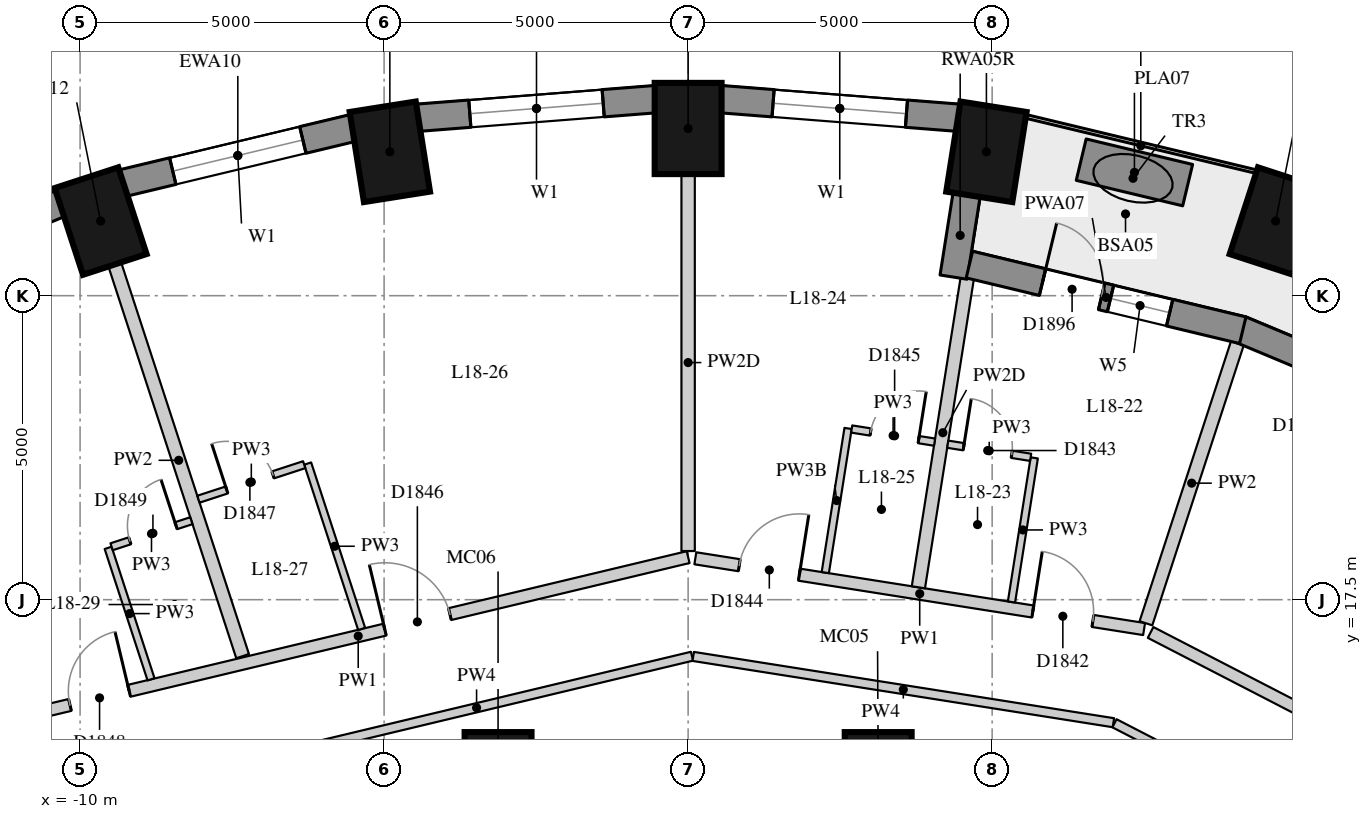
"""IFC4 building model, lengths in metres.
Left out: names, types, materials, properties, quantities, classifications, styles, units other than length and angle.
Written with IfcOpenShell. Run it as: python <this file> out.ifc"""

import sys

from ifc_helpers import new_model, si_unit, direction, frame, frame_2d, origin, origin_2d, place, context, subcontext, project, spatial, rectangle, extrude, element, fill, save


model = new_model("IFC4")
c1 = context("Model", 3, precision=1e-05, world=origin(), true_north=direction((0.0, 1.0)))
c2 = subcontext(c1, "Body", "Model", "MODEL_VIEW")
j1 = project(units=[si_unit("LENGTHUNIT", "METRE"), si_unit("PLANEANGLEUNIT", "RADIAN")], contexts=[c1])
p1 = place(None, origin())
s1 = spatial("IfcSite", under=j1, at=p1, CompositionType="ELEMENT")
p2 = place(p1, origin())
s2 = spatial("IfcBuilding", under=s1, at=p2, CompositionType="ELEMENT")
p3 = place(p2, frame((0.0, 0.0, 67.9)))
s3 = spatial("IfcBuildingStorey", under=s2, at=p3, CompositionType="ELEMENT", Elevation=67.9)
for number, where, z_axis, x_axis in (
    (1, (9.662, 23.727, 0.0), (0.0, 0.0, 1.0), (0.31, 0.951, 0.0)),
    (2, (4.906, 24.866, 0.0), (0.0, 0.0, 1.0), (0.156, 0.988, 0.0)),
    (3, (0.0, 25.25, 0.0), (0.0, 0.0, 1.0), (0.0, 1.0, 0.0)),
    (4, (-4.906, 24.866, 0.0), (0.0, 0.0, 1.0), (-0.156, 0.988, 0.0)),
    (5, (-9.662, 23.727, 0.0), (0.0, 0.0, 1.0), (-0.31, 0.951, 0.0)),
):
    element("IfcColumn", number, at=place(p3, frame(where, z_axis=z_axis, x_axis=x_axis)), inside=s3, PredefinedType="COLUMN", context=c2, shape_type="SweptSolid", body=[
        extrude(rectangle(XDim=1.5, YDim=1.1, at=origin_2d()), origin(), (0.0, 0.0, 1.0), 3.3),
    ])
for number, where, z_axis, x_axis in (
    (6, (3.126, 14.772, 0.0), (0.0, 0.0, 1.0), (1.0, 0.0, 0.0)),
    (7, (-3.126, 14.772, 0.0), (0.0, 0.0, 1.0), (1.0, 0.0, 0.0)),
):
    element("IfcColumn", number, at=place(p3, frame(where, z_axis=z_axis, x_axis=x_axis)), inside=s3, PredefinedType="COLUMN", context=c2, shape_type="SweptSolid", body=[
        extrude(rectangle(XDim=1.1, YDim=1.1, at=origin_2d()), origin(), (0.0, 0.0, 1.0), 3.3),
    ])
p4 = place(p3, frame((4.457, 25.426, 0.0), z_axis=(0.0, 0.0, 1.0), x_axis=(-0.996955972145, 0.077966592873, 0.0)))
e8 = element("IfcWall", 8, at=p4, inside=s3, PredefinedType="SOLIDWALL", context=c2, shape_type="SweptSolid", body=[
    extrude(rectangle(XDim=3.939, YDim=0.45, at=frame_2d((1.97, 0.0))), origin(), (0.0, 0.0, 1.0), 3.02),
])
p5 = place(p4, frame((0.87, 0.0, 0.4)))
e9 = element("IfcOpeningElement", 9, at=p5, cuts=e8, PredefinedType="OPENING", context=c2, shape_type="SweptSolid", body=[
    extrude(rectangle(XDim=2.2, YDim=1.75, at=frame_2d((1.1, 0.875))), frame((0.0, 0.235, 0.0), z_axis=(0.0, -1.0, 0.0), x_axis=(1.0, 0.0, 0.0)), (0.0, 0.0, 1.0), 0.47),
])
p6 = place(p3, frame((-0.53, 25.733, 0.0), z_axis=(0.0, 0.0, 1.0), x_axis=(-0.996955972145, -0.077966592873, 0.0)))
e10 = element("IfcWall", 10, at=p6, inside=s3, PredefinedType="SOLIDWALL", context=c2, shape_type="SweptSolid", body=[
    extrude(rectangle(XDim=3.939, YDim=0.45, at=frame_2d((1.97, 0.0))), origin(), (0.0, 0.0, 1.0), 3.02),
])
p7 = place(p6, frame((0.87, 0.0, 0.4)))
e11 = element("IfcOpeningElement", 11, at=p7, cuts=e10, PredefinedType="OPENING", context=c2, shape_type="SweptSolid", body=[
    extrude(rectangle(XDim=2.2, YDim=1.75, at=frame_2d((1.1, 0.875))), frame((0.0, 0.235, 0.0), z_axis=(0.0, -1.0, 0.0), x_axis=(1.0, 0.0, 0.0)), (0.0, 0.0, 1.0), 0.47),
])
p8 = place(p3, frame((-5.504, 25.26, 0.0), z_axis=(0.0, 0.0, 1.0), x_axis=(-0.972496561493, -0.232917233979, 0.0)))
e12 = element("IfcWall", 12, at=p8, inside=s3, PredefinedType="SOLIDWALL", context=c2, shape_type="SweptSolid", body=[
    extrude(rectangle(XDim=3.911, YDim=0.45, at=frame_2d((1.956, 0.0))), origin(), (0.0, 0.0, 1.0), 3.02),
])
p9 = place(p8, frame((0.855, 0.0, 0.4)))
e13 = element("IfcOpeningElement", 13, at=p9, cuts=e12, PredefinedType="OPENING", context=c2, shape_type="SweptSolid", body=[
    extrude(rectangle(XDim=2.2, YDim=1.75, at=frame_2d((1.1, 0.875))), frame((0.0, 0.235, 0.0), z_axis=(0.0, -1.0, 0.0), x_axis=(1.0, 0.0, 0.0)), (0.0, 0.0, 1.0), 0.47),
])
p10 = place(p3, frame((-10.315, 24.021, 0.0), z_axis=(0.0, 0.0, 1.0), x_axis=(-0.923031964282, -0.384723267966, 0.0)))
e14 = element("IfcWall", 14, at=p10, inside=s3, PredefinedType="SOLIDWALL", context=c2, shape_type="SweptSolid", body=[
    extrude(rectangle(XDim=3.856, YDim=0.45, at=frame_2d((1.928, 0.0))), origin(), (0.0, 0.0, 1.0), 3.02),
])
p11 = place(p10, frame((0.828, 0.0, 0.4)))
e15 = element("IfcOpeningElement", 15, at=p11, cuts=e14, PredefinedType="OPENING", context=c2, shape_type="SweptSolid", body=[
    extrude(rectangle(XDim=2.2, YDim=1.75, at=frame_2d((1.1, 0.875))), frame((0.0, 0.235, 0.0), z_axis=(0.0, -1.0, 0.0), x_axis=(1.0, 0.0, 0.0)), (0.0, 0.0, 1.0), 0.47),
])
p12 = place(p3, frame((4.583, 24.178, 0.0), z_axis=(0.0, 0.0, 1.0), x_axis=(-0.156133927791, -0.98773589415, 0.0)))
e16 = element("IfcWall", 16, at=p12, inside=s3, PredefinedType="SOLIDWALL", context=c2, shape_type="SweptSolid", body=[
    extrude(rectangle(XDim=1.39, YDim=0.45, at=frame_2d((0.695, 0.0))), origin(), (0.0, 0.0, 1.0), 2.47),
])
p13 = place(p3, frame((13.31, 20.178, 0.0), z_axis=(0.0, 0.0, 1.0), x_axis=(-0.922634412489, 0.385675693935, 0.0)))
e17 = element("IfcWall", 17, at=p13, inside=s3, PredefinedType="SOLIDWALL", context=c2, shape_type="SweptSolid", body=[
    extrude(rectangle(XDim=4.577, YDim=0.45, at=frame_2d((2.288, 0.0))), origin(), (0.0, 0.0, 1.0), 3.02),
])
p14 = place(p13, frame((1.213, 0.0, 0.4)))
e18 = element("IfcOpeningElement", 18, at=p14, cuts=e17, PredefinedType="OPENING", context=c2, shape_type="SweptSolid", body=[
    extrude(rectangle(XDim=1.0, YDim=1.75, at=frame_2d((0.5, 0.875))), frame((0.0, 0.235, 0.0), z_axis=(0.0, -1.0, 0.0), x_axis=(1.0, 0.0, 0.0)), (0.0, 0.0, 1.0), 0.47),
])
p15 = place(p13, frame((2.363, 0.0, 0.0)))
e19 = element("IfcOpeningElement", 19, at=p15, cuts=e17, PredefinedType="OPENING", context=c2, shape_type="SweptSolid", body=[
    extrude(rectangle(XDim=1.0, YDim=2.15, at=frame_2d((0.5, 1.075))), frame((0.0, 0.235, 0.0), z_axis=(0.0, -1.0, 0.0), x_axis=(1.0, 0.0, 0.0)), (0.0, 0.0, 1.0), 0.47),
])
p16 = place(p3, frame((9.122, 21.932, 0.0), z_axis=(0.0, 0.0, 1.0), x_axis=(-0.972346547441, 0.233542697764, 0.0)))
e20 = element("IfcWall", 20, at=p16, inside=s3, PredefinedType="SOLIDWALL", context=c2, shape_type="SweptSolid", body=[
    extrude(rectangle(XDim=4.624, YDim=0.45, at=frame_2d((2.312, 0.0))), origin(), (0.0, 0.0, 1.0), 3.02),
])
p17 = place(p16, frame((1.237, 0.0, 0.4)))
e21 = element("IfcOpeningElement", 21, at=p17, cuts=e20, PredefinedType="OPENING", context=c2, shape_type="SweptSolid", body=[
    extrude(rectangle(XDim=1.0, YDim=1.75, at=frame_2d((0.5, 0.875))), frame((0.0, 0.235, 0.0), z_axis=(0.0, -1.0, 0.0), x_axis=(1.0, 0.0, 0.0)), (0.0, 0.0, 1.0), 0.47),
])
p18 = place(p16, frame((2.387, 0.0, 0.0)))
e22 = element("IfcOpeningElement", 22, at=p18, cuts=e20, PredefinedType="OPENING", context=c2, shape_type="SweptSolid", body=[
    extrude(rectangle(XDim=1.0, YDim=2.15, at=frame_2d((0.5, 1.075))), frame((0.0, 0.235, 0.0), z_axis=(0.0, -1.0, 0.0), x_axis=(1.0, 0.0, 0.0)), (0.0, 0.0, 1.0), 0.47),
])
p19 = place(p3, frame((8.215, 24.318, 0.0), z_axis=(0.0, 0.0, 1.0), x_axis=(-0.972504142103, 0.232885580473, 0.0)))
e23 = element("IfcWall", 23, at=p19, inside=s3, PredefinedType="USERDEFINED", context=c2, shape_type="SweptSolid", body=[
    extrude(rectangle(XDim=1.8, YDim=0.7, at=frame_2d((0.9, 0.0))), origin(), (0.0, 0.0, 1.0), 0.75),
])
p20 = place(p3, frame((-10.852, 15.605, 0.0), z_axis=(0.0, 0.0, 1.0), x_axis=(0.972573296372, 0.232596610431, 0.0)))
e24 = element("IfcWall", 24, at=p20, inside=s3, PredefinedType="PARTITIONING", context=c2, shape_type="SweptSolid", body=[
    extrude(rectangle(XDim=11.157, YDim=0.2, at=frame_2d((5.579, 0.0))), origin(), (0.0, 0.0, 1.0), 3.02),
])
p21 = place(p20, frame((6.029, 0.0, 0.0)))
e25 = element("IfcOpeningElement", 25, at=p21, cuts=e24, PredefinedType="OPENING", context=c2, shape_type="SweptSolid", body=[
    extrude(rectangle(XDim=1.1, YDim=2.1, at=frame_2d((0.55, 1.05))), frame((0.0, 0.11, 0.0), z_axis=(0.0, -1.0, 0.0), x_axis=(1.0, 0.0, 0.0)), (0.0, 0.0, 1.0), 0.22),
])
p22 = place(p20, frame((0.705, 0.0, 0.0)))
e26 = element("IfcOpeningElement", 26, at=p22, cuts=e24, PredefinedType="OPENING", context=c2, shape_type="SweptSolid", body=[
    extrude(rectangle(XDim=1.0, YDim=2.1, at=frame_2d((0.5, 1.05))), frame((0.0, 0.11, 0.0), z_axis=(0.0, -1.0, 0.0), x_axis=(1.0, 0.0, 0.0)), (0.0, 0.0, 1.0), 0.22),
])
p23 = place(p3, frame((0.119, 18.181, 0.0), z_axis=(0.0, 0.0, 1.0), x_axis=(0.987788122462, -0.155803161464, 0.0)))
e27 = element("IfcWall", 27, at=p23, inside=s3, PredefinedType="PARTITIONING", context=c2, shape_type="SweptSolid", body=[
    extrude(rectangle(XDim=7.471, YDim=0.2, at=frame_2d((3.736, 0.0))), origin(), (0.0, 0.0, 1.0), 3.02),
])
p24 = place(p23, frame((5.619, 0.0, 0.0)))
e28 = element("IfcOpeningElement", 28, at=p24, cuts=e27, PredefinedType="OPENING", context=c2, shape_type="SweptSolid", body=[
    extrude(rectangle(XDim=1.0, YDim=2.1, at=frame_2d((0.5, 1.05))), frame((0.0, 0.11, 0.0), z_axis=(0.0, -1.0, 0.0), x_axis=(1.0, 0.0, 0.0)), (0.0, 0.0, 1.0), 0.22),
])
p25 = place(p23, frame((0.732, 0.0, 0.0)))
e29 = element("IfcOpeningElement", 29, at=p25, cuts=e27, PredefinedType="OPENING", context=c2, shape_type="SweptSolid", body=[
    extrude(rectangle(XDim=1.0, YDim=2.1, at=frame_2d((0.5, 1.05))), frame((0.0, 0.11, 0.0), z_axis=(0.0, -1.0, 0.0), x_axis=(1.0, 0.0, 0.0)), (0.0, 0.0, 1.0), 0.22),
])
p26 = place(p3, frame((7.606, 16.961, 0.0), z_axis=(0.0, 0.0, 1.0), x_axis=(0.888519518851, -0.45883882205, 0.0)))
e30 = element("IfcWall", 30, at=p26, inside=s3, PredefinedType="PARTITIONING", context=c2, shape_type="SweptSolid", body=[
    extrude(rectangle(XDim=7.142, YDim=0.2, at=frame_2d((3.571, 0.0))), origin(), (0.0, 0.0, 1.0), 3.02),
])
p27 = place(p26, frame((3.342, 0.0, 0.0)))
e31 = element("IfcOpeningElement", 31, at=p27, cuts=e30, PredefinedType="OPENING", context=c2, shape_type="SweptSolid", body=[
    extrude(rectangle(XDim=1.1, YDim=2.1, at=frame_2d((0.55, 1.05))), frame((0.0, 0.11, 0.0), z_axis=(0.0, -1.0, 0.0), x_axis=(1.0, 0.0, 0.0)), (0.0, 0.0, 1.0), 0.22),
])
p28 = place(p3, frame((-7.022, 14.875, 0.0), z_axis=(0.0, 0.0, 1.0), x_axis=(0.972565872543, 0.232627650043, 0.0)))
e32 = element("IfcWall", 32, at=p28, inside=s3, PredefinedType="PARTITIONING", context=c2, shape_type="SweptSolid", body=[
    extrude(rectangle(XDim=7.286, YDim=0.15, at=frame_2d((3.643, 0.0))), origin(), (0.0, 0.0, 1.0), 3.02),
])
p29 = place(p3, frame((0.083, 16.567, 0.0), z_axis=(0.0, 0.0, 1.0), x_axis=(0.987781067139, -0.15584788546, 0.0)))
e33 = element("IfcWall", 33, at=p29, inside=s3, PredefinedType="PARTITIONING", context=c2, shape_type="SweptSolid", body=[
    extrude(rectangle(XDim=6.996, YDim=0.15, at=frame_2d((3.498, 0.0))), origin(), (0.0, 0.0, 1.0), 3.02),
])
p30 = place(p3, frame((7.012, 15.467, 0.0), z_axis=(0.0, 0.0, 1.0), x_axis=(0.888509096081, -0.458859004685, 0.0)))
e34 = element("IfcWall", 34, at=p30, inside=s3, PredefinedType="PARTITIONING", context=c2, shape_type="SweptSolid", body=[
    extrude(rectangle(XDim=6.561, YDim=0.15, at=frame_2d((3.281, 0.0))), origin(), (0.0, 0.0, 1.0), 3.02),
])
p31 = place(p3, frame((9.034, 21.721, 0.0), z_axis=(0.0, 0.0, 1.0), x_axis=(-0.310330277344, -0.95062880188, 0.0)))
e35 = element("IfcWall", 35, at=p31, inside=s3, PredefinedType="PARTITIONING", context=c2, shape_type="SweptSolid", body=[
    extrude(rectangle(XDim=4.848, YDim=0.22, at=frame_2d((2.424, 0.0))), origin(), (0.0, 0.0, 1.0), 3.02),
])
p32 = place(p3, frame((4.591, 22.789, 0.0), z_axis=(0.0, 0.0, 1.0), x_axis=(-0.156172011014, -0.987729873486, 0.0)))
e36 = element("IfcWall", 36, at=p32, inside=s3, PredefinedType="PARTITIONING", context=c2, shape_type="SweptSolid", body=[
    extrude(rectangle(XDim=5.148, YDim=0.22, at=frame_2d((2.574, 0.0))), origin(), (0.0, 0.0, 1.0), 2.47),
])
p33 = place(p3, frame((0.0, 24.5, 0.0), z_axis=(0.0, 0.0, 1.0), x_axis=(0.0, -1.0, 0.0)))
e37 = element("IfcWall", 37, at=p33, inside=s3, PredefinedType="PARTITIONING", context=c2, shape_type="SweptSolid", body=[
    extrude(rectangle(XDim=6.2, YDim=0.22, at=frame_2d((3.1, 0.0))), origin(), (0.0, 0.0, 1.0), 2.47),
])
p34 = place(p3, frame((-9.429, 23.014, 0.0), z_axis=(0.0, 0.0, 1.0), x_axis=(0.310223739243, -0.950663574357, 0.0)))
e38 = element("IfcWall", 38, at=p34, inside=s3, PredefinedType="PARTITIONING", context=c2, shape_type="SweptSolid", body=[
    extrude(rectangle(XDim=6.778, YDim=0.22, at=frame_2d((3.389, 0.0))), origin(), (0.0, 0.0, 1.0), 3.02),
])
p35 = place(p3, frame((5.318, 17.462, 0.0), z_axis=(0.0, 0.0, 1.0), x_axis=(0.156077517275, 0.987744809453, 0.0)))
e39 = element("IfcWall", 39, at=p35, inside=s3, PredefinedType="PARTITIONING", context=c2, shape_type="SweptSolid", body=[
    extrude(rectangle(XDim=2.399, YDim=0.12, at=frame_2d((1.2, 0.0))), origin(), (0.0, 0.0, 1.0), 3.02),
])
p36 = place(p3, frame((2.256, 17.945, 0.0), z_axis=(0.0, 0.0, 1.0), x_axis=(0.156114026572, 0.987739039781, 0.0)))
e40 = element("IfcWall", 40, at=p36, inside=s3, PredefinedType="PARTITIONING", context=c2, shape_type="SweptSolid", body=[
    extrude(rectangle(XDim=2.401, YDim=0.12, at=frame_2d((1.2, 0.0))), origin(), (0.0, 0.0, 1.0), 2.47),
])
p37 = place(p3, frame((-5.369, 17.019, 0.0), z_axis=(0.0, 0.0, 1.0), x_axis=(-0.310231838646, 0.950660931295, 0.0)))
e41 = element("IfcWall", 41, at=p37, inside=s3, PredefinedType="PARTITIONING", context=c2, shape_type="SweptSolid", body=[
    extrude(rectangle(XDim=2.861, YDim=0.12, at=frame_2d((1.431, 0.0))), origin(), (0.0, 0.0, 1.0), 3.02),
])
p38 = place(p3, frame((-8.833, 16.19, 0.0), z_axis=(0.0, 0.0, 1.0), x_axis=(-0.310231525188, 0.950661033586, 0.0)))
e42 = element("IfcWall", 42, at=p38, inside=s3, PredefinedType="PARTITIONING", context=c2, shape_type="SweptSolid", body=[
    extrude(rectangle(XDim=2.274, YDim=0.12, at=frame_2d((1.137, 0.0))), origin(), (0.0, 0.0, 1.0), 3.02),
])
p39 = place(p3, frame((5.633, 19.842, 0.0), z_axis=(0.0, 0.0, 1.0), x_axis=(-0.987722767831, 0.156216945011, 0.0)))
e43 = element("IfcWall", 43, at=p39, inside=s3, PredefinedType="PARTITIONING", context=c2, shape_type="SweptSolid", body=[
    extrude(rectangle(XDim=1.38, YDim=0.12, at=frame_2d((0.69, 0.0))), origin(), (0.0, 0.0, 1.0), 3.02),
])
p40 = place(p39, frame((0.315, 0.0, 0.0)))
e44 = element("IfcOpeningElement", 44, at=p40, cuts=e43, PredefinedType="OPENING", context=c2, shape_type="SweptSolid", body=[
    extrude(rectangle(XDim=0.8, YDim=2.1, at=frame_2d((0.4, 1.05))), frame((0.0, 0.07, 0.0), z_axis=(0.0, -1.0, 0.0), x_axis=(1.0, 0.0, 0.0)), (0.0, 0.0, 1.0), 0.14),
])
p41 = place(p3, frame((2.69, 20.307, 0.0), z_axis=(0.0, 0.0, 1.0), x_axis=(0.987695455518, -0.156389536571, 0.0)))
e45 = element("IfcWall", 45, at=p41, inside=s3, PredefinedType="PARTITIONING", context=c2, shape_type="SweptSolid", body=[
    extrude(rectangle(XDim=1.38, YDim=0.12, at=frame_2d((0.69, 0.0))), origin(), (0.0, 0.0, 1.0), 3.02),
])
p42 = place(p41, frame((0.315, 0.0, 0.0)))
e46 = element("IfcOpeningElement", 46, at=p42, cuts=e45, PredefinedType="OPENING", context=c2, shape_type="SweptSolid", body=[
    extrude(rectangle(XDim=0.8, YDim=2.1, at=frame_2d((0.4, 1.05))), frame((0.0, 0.07, 0.0), z_axis=(0.0, -1.0, 0.0), x_axis=(1.0, 0.0, 0.0)), (0.0, 0.0, 1.0), 0.14),
])
p43 = place(p3, frame((-6.314, 19.72, 0.0), z_axis=(0.0, 0.0, 1.0), x_axis=(-0.950639191072, -0.310298450524, 0.0)))
e47 = element("IfcWall", 47, at=p43, inside=s3, PredefinedType="PARTITIONING", context=c2, shape_type="SweptSolid", body=[
    extrude(rectangle(XDim=1.83, YDim=0.12, at=frame_2d((0.915, 0.0))), origin(), (0.0, 0.0, 1.0), 3.02),
])
p44 = place(p43, frame((0.54, 0.0, 0.0)))
e48 = element("IfcOpeningElement", 48, at=p44, cuts=e47, PredefinedType="OPENING", context=c2, shape_type="SweptSolid", body=[
    extrude(rectangle(XDim=0.8, YDim=2.1, at=frame_2d((0.4, 1.05))), frame((0.0, 0.07, 0.0), z_axis=(0.0, -1.0, 0.0), x_axis=(1.0, 0.0, 0.0)), (0.0, 0.0, 1.0), 0.14),
])
p45 = place(p3, frame((-9.481, 18.371, 0.0), z_axis=(0.0, 0.0, 1.0), x_axis=(0.950576687533, 0.310489872812, 0.0)))
e49 = element("IfcWall", 49, at=p45, inside=s3, PredefinedType="PARTITIONING", context=c2, shape_type="SweptSolid", body=[
    extrude(rectangle(XDim=1.38, YDim=0.12, at=frame_2d((0.69, 0.0))), origin(), (0.0, 0.0, 1.0), 3.02),
])
p46 = place(p45, frame((0.315, 0.0, 0.0)))
e50 = element("IfcOpeningElement", 50, at=p46, cuts=e49, PredefinedType="OPENING", context=c2, shape_type="SweptSolid", body=[
    extrude(rectangle(XDim=0.8, YDim=2.1, at=frame_2d((0.4, 1.05))), frame((0.0, 0.07, 0.0), z_axis=(0.0, -1.0, 0.0), x_axis=(1.0, 0.0, 0.0)), (0.0, 0.0, 1.0), 0.14),
])
p47 = place(p5, origin())
e51 = element("IfcWindow", 51, at=p47, inside=s3, PartitioningType="SINGLE_PANEL", PredefinedType="WINDOW", context=c2, shape_type="SweptSolid", body=[
    extrude(rectangle(XDim=2.2, YDim=1.75, at=frame_2d((1.1, 0.875))), frame((0.0, 0.035, 0.0), z_axis=(0.0, -1.0, 0.0), x_axis=(1.0, 0.0, 0.0)), (0.0, 0.0, 1.0), 0.06),
])
fill(e9, e51)
p48 = place(p7, origin())
e52 = element("IfcWindow", 52, at=p48, inside=s3, PartitioningType="SINGLE_PANEL", PredefinedType="WINDOW", context=c2, shape_type="SweptSolid", body=[
    extrude(rectangle(XDim=2.2, YDim=1.75, at=frame_2d((1.1, 0.875))), frame((0.0, 0.035, 0.0), z_axis=(0.0, -1.0, 0.0), x_axis=(1.0, 0.0, 0.0)), (0.0, 0.0, 1.0), 0.06),
])
fill(e11, e52)
p49 = place(p9, origin())
e53 = element("IfcWindow", 53, at=p49, inside=s3, PartitioningType="SINGLE_PANEL", PredefinedType="WINDOW", context=c2, shape_type="SweptSolid", body=[
    extrude(rectangle(XDim=2.2, YDim=1.75, at=frame_2d((1.1, 0.875))), frame((0.0, 0.035, 0.0), z_axis=(0.0, -1.0, 0.0), x_axis=(1.0, 0.0, 0.0)), (0.0, 0.0, 1.0), 0.06),
])
fill(e13, e53)
p50 = place(p17, origin())
e54 = element("IfcWindow", 54, at=p50, inside=s3, PartitioningType="SINGLE_PANEL", PredefinedType="WINDOW", context=c2, shape_type="SweptSolid", body=[
    extrude(rectangle(XDim=1.0, YDim=1.75, at=frame_2d((0.5, 0.875))), frame((0.0, 0.035, 0.0), z_axis=(0.0, -1.0, 0.0), x_axis=(1.0, 0.0, 0.0)), (0.0, 0.0, 1.0), 0.06),
])
fill(e21, e54)
p51 = place(p18, frame((1.0, 0.0, 0.0), z_axis=(0.0, 0.0, 1.0), x_axis=(-1.0, 0.0, 0.0)))
e55 = element("IfcDoor", 55, at=p51, inside=s3, OperationType="SINGLE_SWING_LEFT", PredefinedType="DOOR", context=c2, shape_type="SweptSolid", body=[
    extrude(rectangle(XDim=1.0, YDim=2.15, at=frame_2d((0.5, 1.075))), frame((0.0, 0.075, 0.0), z_axis=(0.0, -1.0, 0.0), x_axis=(1.0, 0.0, 0.0)), (0.0, 0.0, 1.0), 0.05),
])
fill(e22, e55)
p52 = place(p24, origin())
e56 = element("IfcDoor", 56, at=p52, inside=s3, OperationType="SINGLE_SWING_LEFT", PredefinedType="DOOR", context=c2, shape_type="SweptSolid", body=[
    extrude(rectangle(XDim=1.0, YDim=2.1, at=frame_2d((0.5, 1.05))), frame((0.0, 0.025, 0.0), z_axis=(0.0, -1.0, 0.0), x_axis=(1.0, 0.0, 0.0)), (0.0, 0.0, 1.0), 0.05),
])
fill(e28, e56)
p53 = place(p40, origin())
e57 = element("IfcDoor", 57, at=p53, inside=s3, OperationType="SINGLE_SWING_LEFT", PredefinedType="DOOR", context=c2, shape_type="SweptSolid", body=[
    extrude(rectangle(XDim=0.8, YDim=2.1, at=frame_2d((0.4, 1.05))), frame((0.0, 0.025, 0.0), z_axis=(0.0, -1.0, 0.0), x_axis=(1.0, 0.0, 0.0)), (0.0, 0.0, 1.0), 0.05),
])
fill(e44, e57)
p54 = place(p25, origin())
e58 = element("IfcDoor", 58, at=p54, inside=s3, OperationType="SINGLE_SWING_RIGHT", PredefinedType="DOOR", context=c2, shape_type="SweptSolid", body=[
    extrude(rectangle(XDim=1.0, YDim=2.1, at=frame_2d((0.5, 1.05))), frame((0.0, 0.025, 0.0), z_axis=(0.0, -1.0, 0.0), x_axis=(1.0, 0.0, 0.0)), (0.0, 0.0, 1.0), 0.05),
])
fill(e29, e58)
p55 = place(p42, origin())
e59 = element("IfcDoor", 59, at=p55, inside=s3, OperationType="SINGLE_SWING_RIGHT", PredefinedType="DOOR", context=c2, shape_type="SweptSolid", body=[
    extrude(rectangle(XDim=0.8, YDim=2.1, at=frame_2d((0.4, 1.05))), frame((0.0, 0.025, 0.0), z_axis=(0.0, -1.0, 0.0), x_axis=(1.0, 0.0, 0.0)), (0.0, 0.0, 1.0), 0.05),
])
fill(e46, e59)
p56 = place(p21, origin())
e60 = element("IfcDoor", 60, at=p56, inside=s3, OperationType="SINGLE_SWING_LEFT", PredefinedType="DOOR", context=c2, shape_type="SweptSolid", body=[
    extrude(rectangle(XDim=1.1, YDim=2.1, at=frame_2d((0.55, 1.05))), frame((0.0, 0.025, 0.0), z_axis=(0.0, -1.0, 0.0), x_axis=(1.0, 0.0, 0.0)), (0.0, 0.0, 1.0), 0.05),
])
fill(e25, e60)
p57 = place(p44, origin())
e61 = element("IfcDoor", 61, at=p57, inside=s3, OperationType="SINGLE_SWING_LEFT", PredefinedType="DOOR", context=c2, shape_type="SweptSolid", body=[
    extrude(rectangle(XDim=0.8, YDim=2.1, at=frame_2d((0.4, 1.05))), frame((0.0, 0.025, 0.0), z_axis=(0.0, -1.0, 0.0), x_axis=(1.0, 0.0, 0.0)), (0.0, 0.0, 1.0), 0.05),
])
fill(e48, e61)
p58 = place(p22, origin())
e62 = element("IfcDoor", 62, at=p58, inside=s3, OperationType="SINGLE_SWING_RIGHT", PredefinedType="DOOR", context=c2, shape_type="SweptSolid", body=[
    extrude(rectangle(XDim=1.0, YDim=2.1, at=frame_2d((0.5, 1.05))), frame((0.0, 0.025, 0.0), z_axis=(0.0, -1.0, 0.0), x_axis=(1.0, 0.0, 0.0)), (0.0, 0.0, 1.0), 0.05),
])
fill(e26, e62)
p59 = place(p46, origin())
e63 = element("IfcDoor", 63, at=p59, inside=s3, OperationType="SINGLE_SWING_RIGHT", PredefinedType="DOOR", context=c2, shape_type="SweptSolid", body=[
    extrude(rectangle(XDim=0.8, YDim=2.1, at=frame_2d((0.4, 1.05))), frame((0.0, 0.025, 0.0), z_axis=(0.0, -1.0, 0.0), x_axis=(1.0, 0.0, 0.0)), (0.0, 0.0, 1.0), 0.05),
])
fill(e50, e63)
save(model, sys.argv[1])
